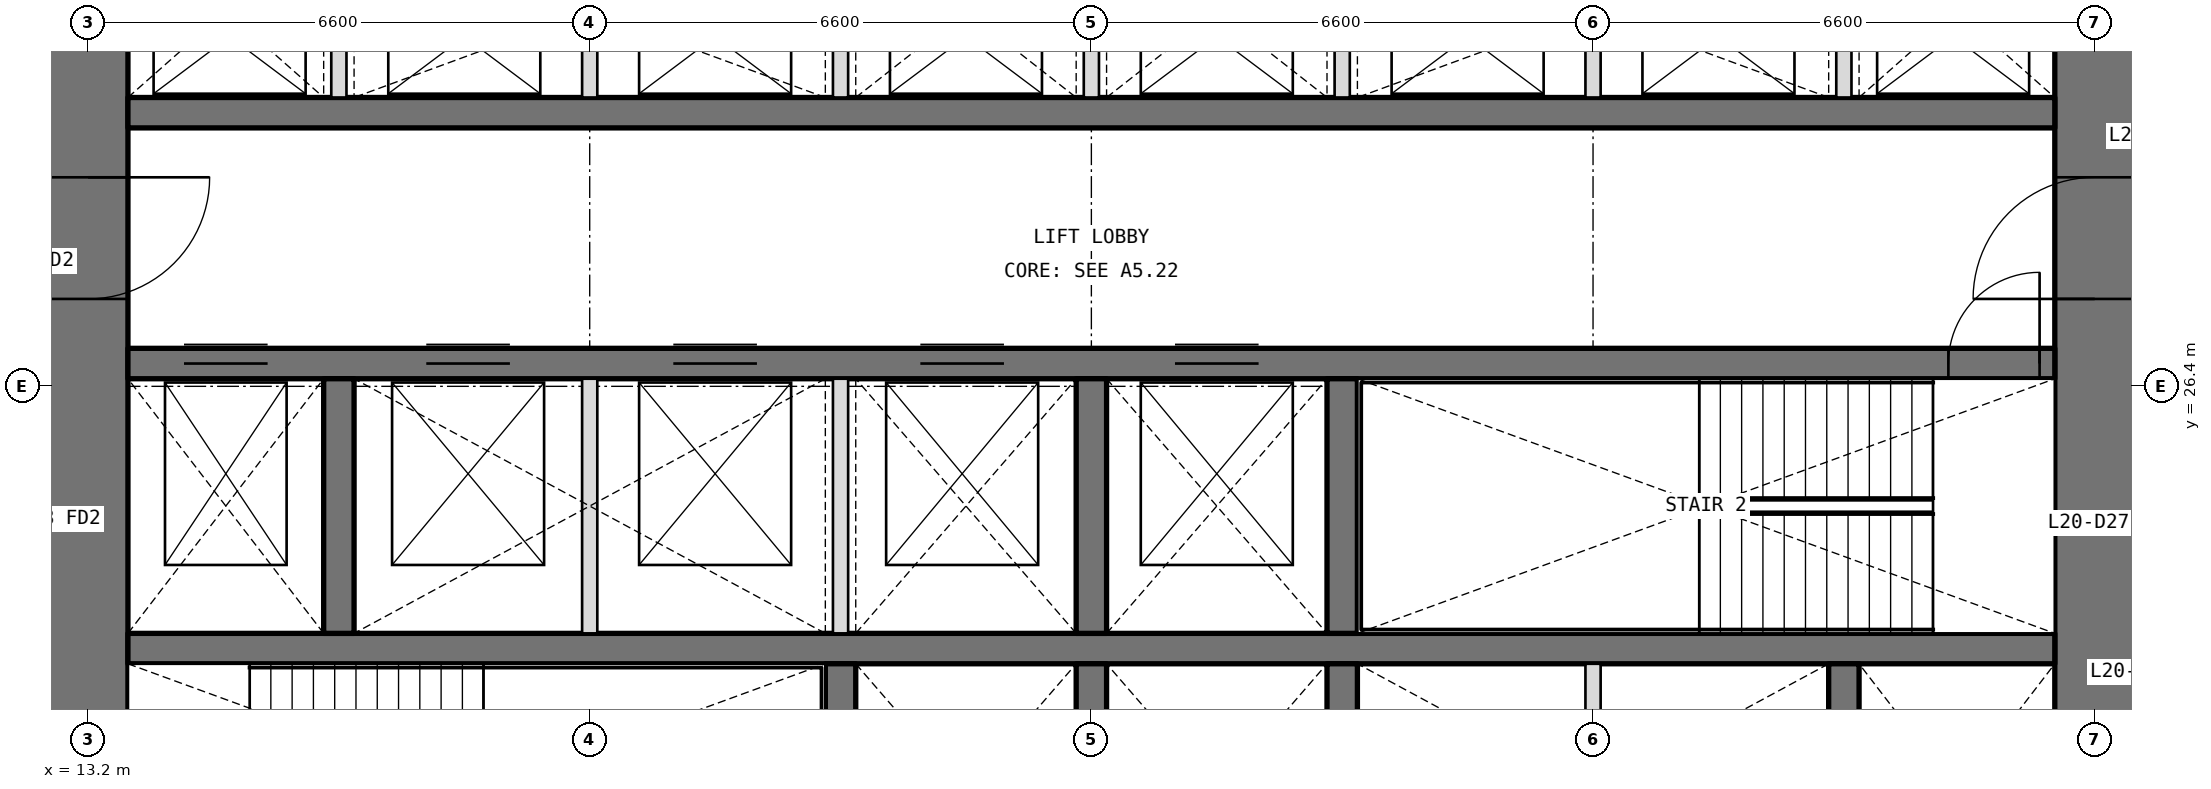
"""IFC4 building model, lengths in metres.
Left out: names, types, materials, properties, quantities, classifications, styles, units other than length and angle.
Written with IfcOpenShell. Run it as: python <this file> out.ifc"""

import sys

from ifc_helpers import new_model, si_unit, direction, frame, frame_2d, origin, place, context, subcontext, project, spatial, rectangle, extrude, element, fill, save


model = new_model("IFC4")
c1 = context("Model", 3, precision=1e-05, world=origin(), true_north=direction((0.0, 1.0)))
c2 = subcontext(c1, "Body", "Model", "MODEL_VIEW")
j1 = project(units=[si_unit("LENGTHUNIT", "METRE"), si_unit("PLANEANGLEUNIT", "RADIAN")], contexts=[c1])
p1 = place(None, origin())
s1 = spatial("IfcSite", under=j1, at=p1, CompositionType="ELEMENT")
p2 = place(p1, origin())
s2 = spatial("IfcBuilding", under=s1, at=p2, CompositionType="ELEMENT")
p3 = place(p2, frame((0.0, 0.0, 90.6)))
s3 = spatial("IfcBuildingStorey", under=s2, at=p3, CompositionType="ELEMENT", Elevation=90.6)
p4 = place(p3, frame((39.6, 13.725, 0.0), z_axis=(0.0, 0.0, 1.0), x_axis=(0.0, 1.0, 0.0)))
e1 = element("IfcWall", 1, at=p4, inside=s3, PredefinedType="SHEAR", context=c2, shape_type="SweptSolid", body=[
    extrude(rectangle(XDim=18.75, YDim=1.05, at=frame_2d((9.375, 0.0))), origin(), (0.0, 0.0, 1.0), 4.2),
])
p5 = place(p4, frame((3.025, 0.0, 0.0)))
e2 = element("IfcOpeningElement", 2, at=p5, cuts=e1, PredefinedType="OPENING", context=c2, shape_type="SweptSolid", body=[
    extrude(rectangle(XDim=1.6, YDim=2.1, at=frame_2d((0.8, 1.05))), frame((0.0, 0.535, 0.0), z_axis=(0.0, -1.0, 0.0), x_axis=(1.0, 0.0, 0.0)), (0.0, 0.0, 1.0), 1.07),
])
p6 = place(p4, frame((13.825, 0.0, 0.0)))
e3 = element("IfcOpeningElement", 3, at=p6, cuts=e1, PredefinedType="OPENING", context=c2, shape_type="SweptSolid", body=[
    extrude(rectangle(XDim=1.6, YDim=2.1, at=frame_2d((0.8, 1.05))), frame((0.0, 0.535, 0.0), z_axis=(0.0, -1.0, 0.0), x_axis=(1.0, 0.0, 0.0)), (0.0, 0.0, 1.0), 1.07),
])
p7 = place(p3, frame((13.2, 32.475, 0.0), z_axis=(0.0, 0.0, 1.0), x_axis=(0.0, -1.0, 0.0)))
e4 = element("IfcWall", 4, at=p7, inside=s3, PredefinedType="SHEAR", context=c2, shape_type="SweptSolid", body=[
    extrude(rectangle(XDim=18.75, YDim=1.05, at=frame_2d((9.375, 0.0))), origin(), (0.0, 0.0, 1.0), 4.2),
])
p8 = place(p7, frame((14.125, 0.0, 0.0)))
e5 = element("IfcOpeningElement", 5, at=p8, cuts=e4, PredefinedType="OPENING", context=c2, shape_type="SweptSolid", body=[
    extrude(rectangle(XDim=1.6, YDim=2.1, at=frame_2d((0.8, 1.05))), frame((0.0, 0.535, 0.0), z_axis=(0.0, -1.0, 0.0), x_axis=(1.0, 0.0, 0.0)), (0.0, 0.0, 1.0), 1.07),
])
p9 = place(p7, frame((3.325, 0.0, 0.0)))
e6 = element("IfcOpeningElement", 6, at=p9, cuts=e4, PredefinedType="OPENING", context=c2, shape_type="SweptSolid", body=[
    extrude(rectangle(XDim=1.6, YDim=2.1, at=frame_2d((0.8, 1.05))), frame((0.0, 0.535, 0.0), z_axis=(0.0, -1.0, 0.0), x_axis=(1.0, 0.0, 0.0)), (0.0, 0.0, 1.0), 1.07),
])
p10 = place(p3, frame((13.725, 22.95, 0.0), z_axis=(0.0, 0.0, 1.0), x_axis=(1.0, 0.0, 0.0)))
e7 = element("IfcWall", 7, at=p10, inside=s3, PredefinedType="SHEAR", context=c2, shape_type="SweptSolid", body=[
    extrude(rectangle(XDim=25.35, YDim=0.4, at=frame_2d((12.675, 0.0))), origin(), (0.0, 0.0, 1.0), 4.2),
])
p11 = place(p3, frame((13.725, 26.7, 0.0), z_axis=(0.0, 0.0, 1.0), x_axis=(1.0, 0.0, 0.0)))
e8 = element("IfcWall", 8, at=p11, inside=s3, PredefinedType="SHEAR", context=c2, shape_type="SweptSolid", body=[
    extrude(rectangle(XDim=25.35, YDim=0.4, at=frame_2d((12.675, 0.0))), origin(), (0.0, 0.0, 1.0), 4.2),
])
p12 = place(p11, frame((23.95, 0.0, 0.0)))
e9 = element("IfcOpeningElement", 9, at=p12, cuts=e8, PredefinedType="OPENING", context=c2, shape_type="SweptSolid", body=[
    extrude(rectangle(XDim=1.2, YDim=2.1, at=frame_2d((0.6, 1.05))), frame((0.0, 0.21, 0.0), z_axis=(0.0, -1.0, 0.0), x_axis=(1.0, 0.0, 0.0)), (0.0, 0.0, 1.0), 0.42),
])
p13 = place(p11, frame((0.738, 0.0, 0.0)))
e10 = element("IfcOpeningElement", 10, at=p13, cuts=e8, PredefinedType="OPENING", context=c2, shape_type="SweptSolid", body=[
    extrude(rectangle(XDim=1.1, YDim=2.1, at=frame_2d((0.55, 1.05))), frame((0.0, 0.21, 0.0), z_axis=(0.0, -1.0, 0.0), x_axis=(1.0, 0.0, 0.0)), (0.0, 0.0, 1.0), 0.42),
])
p14 = place(p11, frame((3.925, 0.0, 0.0)))
e11 = element("IfcOpeningElement", 11, at=p14, cuts=e8, PredefinedType="OPENING", context=c2, shape_type="SweptSolid", body=[
    extrude(rectangle(XDim=1.1, YDim=2.1, at=frame_2d((0.55, 1.05))), frame((0.0, 0.21, 0.0), z_axis=(0.0, -1.0, 0.0), x_axis=(1.0, 0.0, 0.0)), (0.0, 0.0, 1.0), 0.42),
])
p15 = place(p11, frame((7.175, 0.0, 0.0)))
e12 = element("IfcOpeningElement", 12, at=p15, cuts=e8, PredefinedType="OPENING", context=c2, shape_type="SweptSolid", body=[
    extrude(rectangle(XDim=1.1, YDim=2.1, at=frame_2d((0.55, 1.05))), frame((0.0, 0.21, 0.0), z_axis=(0.0, -1.0, 0.0), x_axis=(1.0, 0.0, 0.0)), (0.0, 0.0, 1.0), 0.42),
])
p16 = place(p11, frame((10.425, 0.0, 0.0)))
e13 = element("IfcOpeningElement", 13, at=p16, cuts=e8, PredefinedType="OPENING", context=c2, shape_type="SweptSolid", body=[
    extrude(rectangle(XDim=1.1, YDim=2.1, at=frame_2d((0.55, 1.05))), frame((0.0, 0.21, 0.0), z_axis=(0.0, -1.0, 0.0), x_axis=(1.0, 0.0, 0.0)), (0.0, 0.0, 1.0), 0.42),
])
p17 = place(p11, frame((13.775, 0.0, 0.0)))
e14 = element("IfcOpeningElement", 14, at=p17, cuts=e8, PredefinedType="OPENING", context=c2, shape_type="SweptSolid", body=[
    extrude(rectangle(XDim=1.1, YDim=2.1, at=frame_2d((0.55, 1.05))), frame((0.0, 0.21, 0.0), z_axis=(0.0, -1.0, 0.0), x_axis=(1.0, 0.0, 0.0)), (0.0, 0.0, 1.0), 0.42),
])
p18 = place(p3, frame((13.725, 30.0, 0.0), z_axis=(0.0, 0.0, 1.0), x_axis=(1.0, 0.0, 0.0)))
e15 = element("IfcWall", 15, at=p18, inside=s3, PredefinedType="SHEAR", context=c2, shape_type="SweptSolid", body=[
    extrude(rectangle(XDim=25.35, YDim=0.4, at=frame_2d((12.675, 0.0))), origin(), (0.0, 0.0, 1.0), 4.2),
])
for number, where, z_axis, x_axis in (
    (16, (23.1, 19.4, 0.0), (0.0, 0.0, 1.0), (0.0, 1.0, 0.0)),
    (17, (26.4, 19.4, 0.0), (0.0, 0.0, 1.0), (0.0, 1.0, 0.0)),
    (18, (29.7, 19.4, 0.0), (0.0, 0.0, 1.0), (0.0, 1.0, 0.0)),
    (19, (36.3, 19.4, 0.0), (0.0, 0.0, 1.0), (0.0, 1.0, 0.0)),
    (20, (16.5, 23.15, 0.0), (0.0, 0.0, 1.0), (0.0, 1.0, 0.0)),
    (21, (26.4, 23.15, 0.0), (0.0, 0.0, 1.0), (0.0, 1.0, 0.0)),
    (22, (29.7, 23.15, 0.0), (0.0, 0.0, 1.0), (0.0, 1.0, 0.0)),
):
    element("IfcWall", number, at=place(p3, frame(where, z_axis=z_axis, x_axis=x_axis)), inside=s3, PredefinedType="SHEAR", context=c2, shape_type="SweptSolid", body=[
        extrude(rectangle(XDim=3.35, YDim=0.4, at=frame_2d((1.675, 0.0))), origin(), (0.0, 0.0, 1.0), 4.2),
    ])
for number, where, z_axis, x_axis in (
    (23, (16.5, 30.2, 0.0), (0.0, 0.0, 1.0), (0.0, 1.0, 0.0)),
    (24, (19.8, 30.2, 0.0), (0.0, 0.0, 1.0), (0.0, 1.0, 0.0)),
    (25, (23.1, 30.2, 0.0), (0.0, 0.0, 1.0), (0.0, 1.0, 0.0)),
    (26, (26.4, 30.2, 0.0), (0.0, 0.0, 1.0), (0.0, 1.0, 0.0)),
    (27, (29.7, 30.2, 0.0), (0.0, 0.0, 1.0), (0.0, 1.0, 0.0)),
    (28, (33.0, 30.2, 0.0), (0.0, 0.0, 1.0), (0.0, 1.0, 0.0)),
    (29, (36.3, 30.2, 0.0), (0.0, 0.0, 1.0), (0.0, 1.0, 0.0)),
):
    element("IfcWall", number, at=place(p3, frame(where, z_axis=z_axis, x_axis=x_axis)), inside=s3, PredefinedType="PARTITIONING", context=c2, shape_type="SweptSolid", body=[
        extrude(rectangle(XDim=2.275, YDim=0.2, at=frame_2d((1.138, 0.0))), origin(), (0.0, 0.0, 1.0), 4.2),
    ])
for number, where, z_axis, x_axis in (
    (30, (33.0, 19.4, 0.0), (0.0, 0.0, 1.0), (0.0, 1.0, 0.0)),
    (31, (19.8, 23.15, 0.0), (0.0, 0.0, 1.0), (0.0, 1.0, 0.0)),
    (32, (23.1, 23.15, 0.0), (0.0, 0.0, 1.0), (0.0, 1.0, 0.0)),
):
    element("IfcWall", number, at=place(p3, frame(where, z_axis=z_axis, x_axis=x_axis)), inside=s3, PredefinedType="PARTITIONING", context=c2, shape_type="SweptSolid", body=[
        extrude(rectangle(XDim=3.35, YDim=0.2, at=frame_2d((1.675, 0.0))), origin(), (0.0, 0.0, 1.0), 4.2),
    ])
p19 = place(p12, origin())
e33 = element("IfcDoor", 33, at=p19, inside=s3, OperationType="SINGLE_SWING_RIGHT", PredefinedType="DOOR", context=c2, shape_type="SweptSolid", body=[
    extrude(rectangle(XDim=1.2, YDim=2.1, at=frame_2d((0.6, 1.05))), frame((0.0, 0.025, 0.0), z_axis=(0.0, -1.0, 0.0), x_axis=(1.0, 0.0, 0.0)), (0.0, 0.0, 1.0), 0.05),
])
fill(e9, e33)
p20 = place(p9, origin())
e34 = element("IfcDoor", 34, at=p20, inside=s3, OperationType="DOUBLE_DOOR_DOUBLE_SWING", PredefinedType="DOOR", context=c2, shape_type="SweptSolid", body=[
    extrude(rectangle(XDim=1.6, YDim=2.1, at=frame_2d((0.8, 1.05))), frame((0.0, 0.025, 0.0), z_axis=(0.0, -1.0, 0.0), x_axis=(1.0, 0.0, 0.0)), (0.0, 0.0, 1.0), 0.05),
])
fill(e6, e34)
p21 = place(p6, origin())
e35 = element("IfcDoor", 35, at=p21, inside=s3, OperationType="DOUBLE_DOOR_DOUBLE_SWING", PredefinedType="DOOR", context=c2, shape_type="SweptSolid", body=[
    extrude(rectangle(XDim=1.6, YDim=2.1, at=frame_2d((0.8, 1.05))), frame((0.0, 0.025, 0.0), z_axis=(0.0, -1.0, 0.0), x_axis=(1.0, 0.0, 0.0)), (0.0, 0.0, 1.0), 0.05),
])
fill(e3, e35)
p22 = place(p13, origin())
e36 = element("IfcDoor", 36, at=p22, inside=s3, OperationType="DOUBLE_DOOR_SLIDING", PredefinedType="DOOR", context=c2, shape_type="SweptSolid", body=[
    extrude(rectangle(XDim=1.1, YDim=2.1, at=frame_2d((0.55, 1.05))), frame((0.0, 0.025, 0.0), z_axis=(0.0, -1.0, 0.0), x_axis=(1.0, 0.0, 0.0)), (0.0, 0.0, 1.0), 0.05),
])
fill(e10, e36)
p23 = place(p14, origin())
e37 = element("IfcDoor", 37, at=p23, inside=s3, OperationType="DOUBLE_DOOR_SLIDING", PredefinedType="DOOR", context=c2, shape_type="SweptSolid", body=[
    extrude(rectangle(XDim=1.1, YDim=2.1, at=frame_2d((0.55, 1.05))), frame((0.0, 0.025, 0.0), z_axis=(0.0, -1.0, 0.0), x_axis=(1.0, 0.0, 0.0)), (0.0, 0.0, 1.0), 0.05),
])
fill(e11, e37)
p24 = place(p15, origin())
e38 = element("IfcDoor", 38, at=p24, inside=s3, OperationType="DOUBLE_DOOR_SLIDING", PredefinedType="DOOR", context=c2, shape_type="SweptSolid", body=[
    extrude(rectangle(XDim=1.1, YDim=2.1, at=frame_2d((0.55, 1.05))), frame((0.0, 0.025, 0.0), z_axis=(0.0, -1.0, 0.0), x_axis=(1.0, 0.0, 0.0)), (0.0, 0.0, 1.0), 0.05),
])
fill(e12, e38)
p25 = place(p16, origin())
e39 = element("IfcDoor", 39, at=p25, inside=s3, OperationType="DOUBLE_DOOR_SLIDING", PredefinedType="DOOR", context=c2, shape_type="SweptSolid", body=[
    extrude(rectangle(XDim=1.1, YDim=2.1, at=frame_2d((0.55, 1.05))), frame((0.0, 0.025, 0.0), z_axis=(0.0, -1.0, 0.0), x_axis=(1.0, 0.0, 0.0)), (0.0, 0.0, 1.0), 0.05),
])
fill(e13, e39)
p26 = place(p17, origin())
e40 = element("IfcDoor", 40, at=p26, inside=s3, OperationType="DOUBLE_DOOR_SLIDING", PredefinedType="DOOR", context=c2, shape_type="SweptSolid", body=[
    extrude(rectangle(XDim=1.1, YDim=2.1, at=frame_2d((0.55, 1.05))), frame((0.0, 0.025, 0.0), z_axis=(0.0, -1.0, 0.0), x_axis=(1.0, 0.0, 0.0)), (0.0, 0.0, 1.0), 0.05),
])
fill(e14, e40)
save(model, sys.argv[1])
